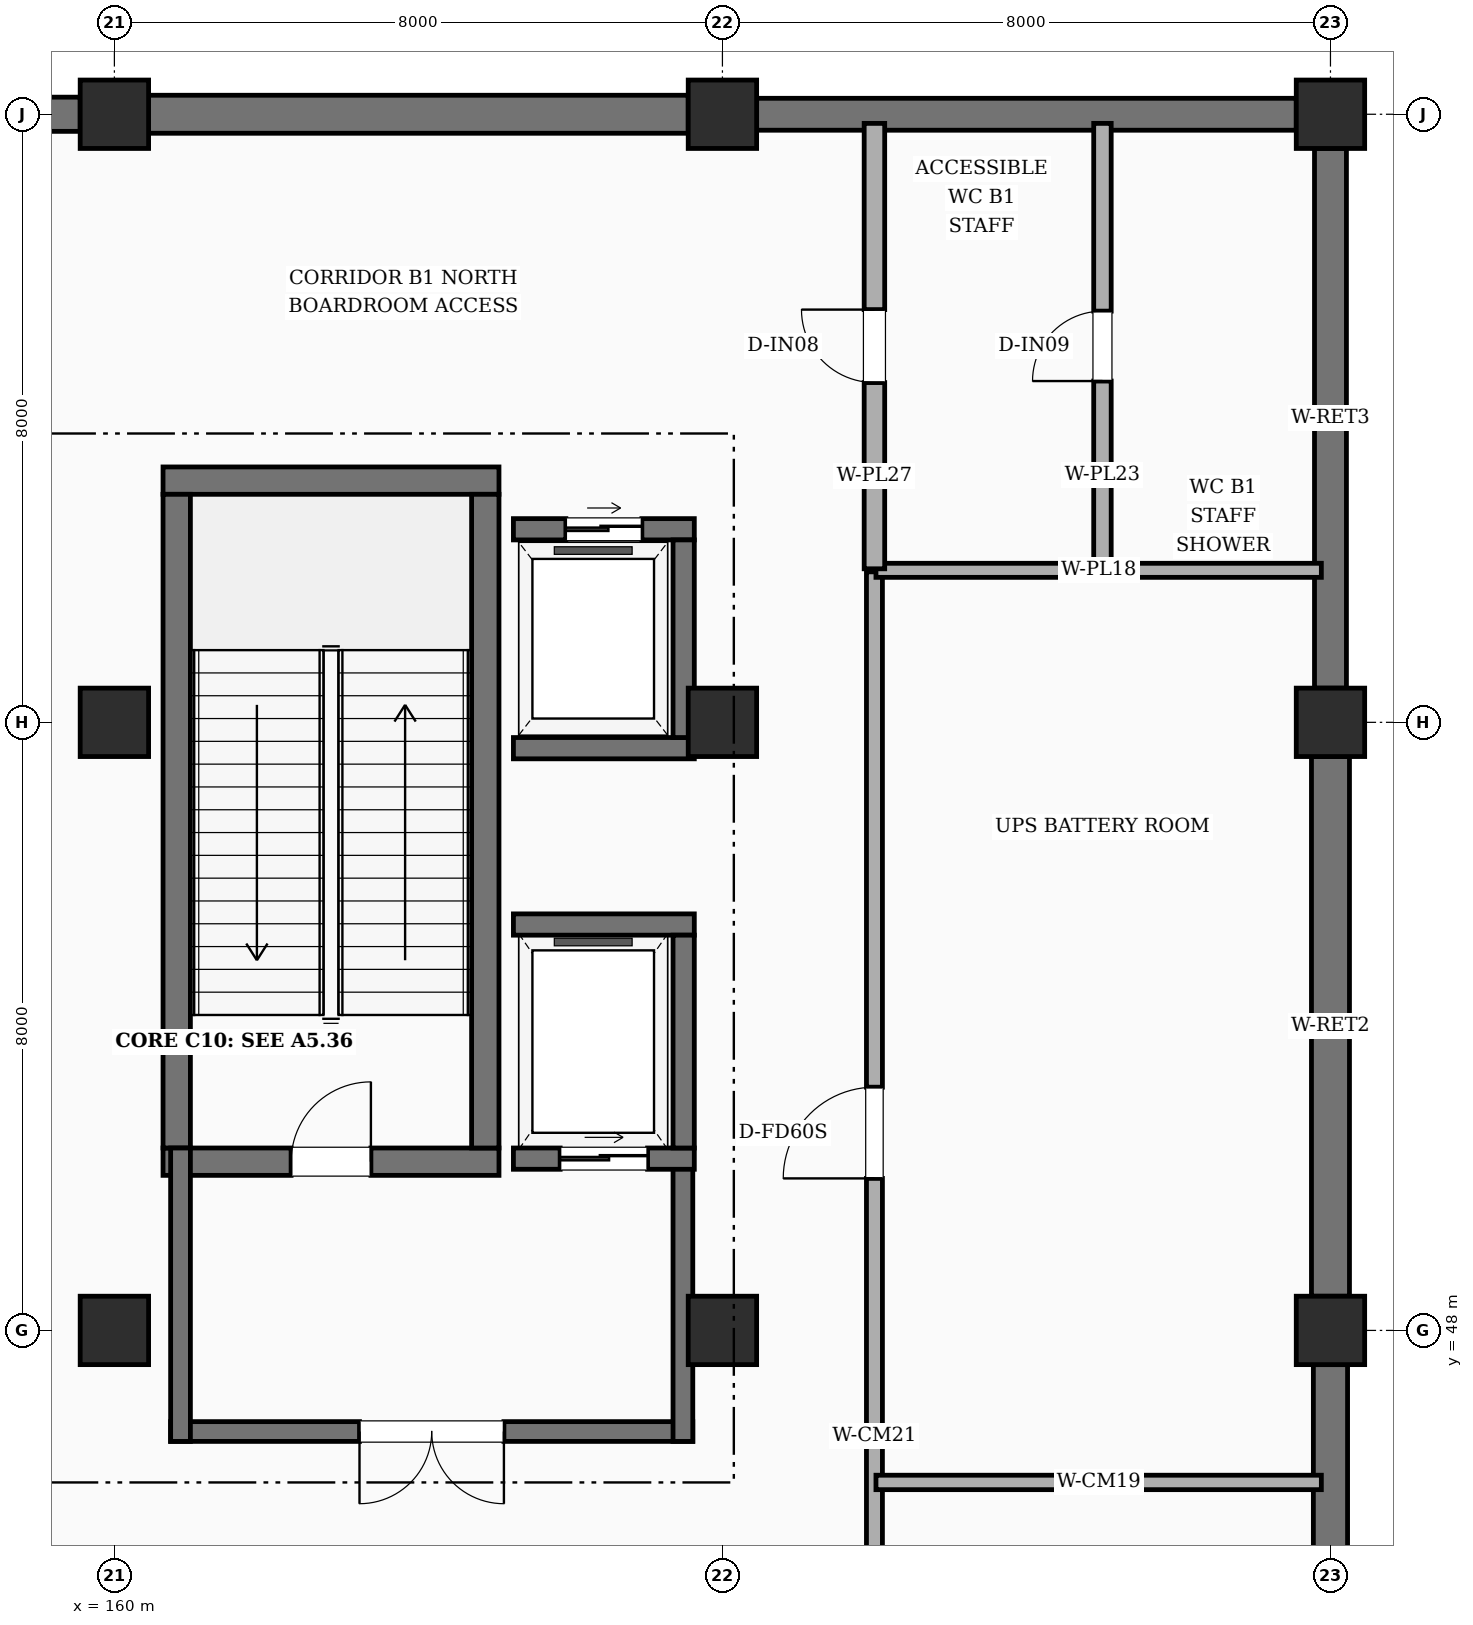
"""IFC4 building model, lengths in metres.
Left out: names, types, materials, properties, quantities, classifications, styles, units other than length and angle.
Written with IfcOpenShell. Run it as: python <this file> out.ifc"""

import sys

from ifc_helpers import new_model, si_unit, direction, frame, frame_2d, origin, origin_2d, place, context, subcontext, project, spatial, rectangle, extrude, element, fill, save


model = new_model("IFC4")
c1 = context("Model", 3, precision=1e-05, world=origin(), true_north=direction((0.0, 1.0)))
c2 = subcontext(c1, "Body", "Model", "MODEL_VIEW")
j1 = project(units=[si_unit("LENGTHUNIT", "METRE"), si_unit("PLANEANGLEUNIT", "RADIAN")], contexts=[c1])
p1 = place(None, origin())
s1 = spatial("IfcSite", under=j1, at=p1, CompositionType="ELEMENT")
p2 = place(p1, origin())
s2 = spatial("IfcBuilding", under=s1, at=p2, CompositionType="ELEMENT")
p3 = place(p2, frame((0.0, 0.0, -5.4)))
s3 = spatial("IfcBuildingStorey", under=s2, at=p3, CompositionType="ELEMENT", Elevation=-5.4)
for number, where, z_axis, x_axis in (
    (1, (160.0, 48.0, -0.4), (0.0, 0.0, 1.0), (1.0, 0.0, 0.0)),
    (2, (160.0, 56.0, -0.4), (0.0, 0.0, 1.0), (1.0, 0.0, 0.0)),
    (3, (160.0, 64.0, -0.4), (0.0, 0.0, 1.0), (1.0, 0.0, 0.0)),
    (4, (168.0, 48.0, -0.4), (0.0, 0.0, 1.0), (1.0, 0.0, 0.0)),
    (5, (168.0, 56.0, -0.4), (0.0, 0.0, 1.0), (1.0, 0.0, 0.0)),
    (6, (168.0, 64.0, -0.4), (0.0, 0.0, 1.0), (1.0, 0.0, 0.0)),
    (7, (176.0, 48.0, -0.4), (0.0, 0.0, 1.0), (1.0, 0.0, 0.0)),
    (8, (176.0, 56.0, -0.4), (0.0, 0.0, 1.0), (1.0, 0.0, 0.0)),
    (9, (176.0, 64.0, -0.4), (0.0, 0.0, 1.0), (1.0, 0.0, 0.0)),
):
    element("IfcColumn", number, at=place(p3, frame(where, z_axis=z_axis, x_axis=x_axis)), inside=s3, PredefinedType="COLUMN", context=c2, shape_type="SweptSolid", body=[
        extrude(rectangle(XDim=0.9, YDim=0.9, at=origin_2d()), origin(), (0.0, 0.0, 1.0), 5.8),
    ])
p4 = place(p3, frame((176.0, 40.45, 0.0), z_axis=(0.0, 0.0, 1.0), x_axis=(0.0, 1.0, 0.0)))
e10 = element("IfcWall", 10, at=p4, inside=s3, PredefinedType="USERDEFINED", context=c2, shape_type="SweptSolid", body=[
    extrude(rectangle(XDim=7.1, YDim=0.45, at=frame_2d((3.55, 0.0))), origin(), (0.0, 0.0, 1.0), 4.36),
])
p5 = place(p3, frame((176.0, 48.45, 0.0), z_axis=(0.0, 0.0, 1.0), x_axis=(0.0, 1.0, 0.0)))
e11 = element("IfcWall", 11, at=p5, inside=s3, PredefinedType="USERDEFINED", context=c2, shape_type="SweptSolid", body=[
    extrude(rectangle(XDim=7.1, YDim=0.5, at=frame_2d((3.55, 0.0))), origin(), (0.0, 0.0, 1.0), 4.36),
])
p6 = place(p3, frame((176.0, 56.45, 0.0), z_axis=(0.0, 0.0, 1.0), x_axis=(0.0, 1.0, 0.0)))
e12 = element("IfcWall", 12, at=p6, inside=s3, PredefinedType="USERDEFINED", context=c2, shape_type="SweptSolid", body=[
    extrude(rectangle(XDim=7.1, YDim=0.42, at=frame_2d((3.55, 0.0))), origin(), (0.0, 0.0, 1.0), 4.36),
])
p7 = place(p3, frame((152.45, 64.0, 0.0), z_axis=(0.0, 0.0, 1.0), x_axis=(1.0, 0.0, 0.0)))
e13 = element("IfcWall", 13, at=p7, inside=s3, PredefinedType="USERDEFINED", context=c2, shape_type="SweptSolid", body=[
    extrude(rectangle(XDim=7.1, YDim=0.45, at=frame_2d((3.55, 0.0))), origin(), (0.0, 0.0, 1.0), 4.11),
])
p8 = place(p3, frame((160.45, 64.0, 0.0), z_axis=(0.0, 0.0, 1.0), x_axis=(1.0, 0.0, 0.0)))
e14 = element("IfcWall", 14, at=p8, inside=s3, PredefinedType="USERDEFINED", context=c2, shape_type="SweptSolid", body=[
    extrude(rectangle(XDim=7.1, YDim=0.5, at=frame_2d((3.55, 0.0))), origin(), (0.0, 0.0, 1.0), 4.11),
])
p9 = place(p3, frame((168.45, 64.0, 0.0), z_axis=(0.0, 0.0, 1.0), x_axis=(1.0, 0.0, 0.0)))
e15 = element("IfcWall", 15, at=p9, inside=s3, PredefinedType="USERDEFINED", context=c2, shape_type="SweptSolid", body=[
    extrude(rectangle(XDim=7.1, YDim=0.42, at=frame_2d((3.55, 0.0))), origin(), (0.0, 0.0, 1.0), 4.11),
])
p10 = place(p3, frame((160.64, 50.22, 0.0), z_axis=(0.0, 0.0, 1.0), x_axis=(1.0, 0.0, 0.0)))
e16 = element("IfcWall", 16, at=p10, inside=s3, PredefinedType="SHEAR", context=c2, shape_type="SweptSolid", body=[
    extrude(rectangle(XDim=4.42, YDim=0.36, at=frame_2d((2.21, 0.0))), origin(), (0.0, 0.0, 1.0), 5.4),
])
p11 = place(p10, frame((1.685, 0.0, 0.0)))
e17 = element("IfcOpeningElement", 17, at=p11, cuts=e16, PredefinedType="OPENING", context=c2, shape_type="SweptSolid", body=[
    extrude(rectangle(XDim=1.05, YDim=2.15, at=frame_2d((0.525, 1.075))), frame((0.0, 0.19, 0.0), z_axis=(0.0, -1.0, 0.0), x_axis=(1.0, 0.0, 0.0)), (0.0, 0.0, 1.0), 0.38),
])
p12 = place(p3, frame((160.64, 59.18, 0.0), z_axis=(0.0, 0.0, 1.0), x_axis=(1.0, 0.0, 0.0)))
e18 = element("IfcWall", 18, at=p12, inside=s3, PredefinedType="SHEAR", context=c2, shape_type="SweptSolid", body=[
    extrude(rectangle(XDim=4.42, YDim=0.36, at=frame_2d((2.21, 0.0))), origin(), (0.0, 0.0, 1.0), 5.4),
])
for number, where, z_axis, x_axis in (
    (19, (160.82, 50.4, 0.0), (0.0, 0.0, 1.0), (0.0, 1.0, 0.0)),
    (20, (164.88, 50.4, 0.0), (0.0, 0.0, 1.0), (0.0, 1.0, 0.0)),
):
    element("IfcWall", number, at=place(p3, frame(where, z_axis=z_axis, x_axis=x_axis)), inside=s3, PredefinedType="SHEAR", context=c2, shape_type="SweptSolid", body=[
        extrude(rectangle(XDim=8.6, YDim=0.36, at=frame_2d((4.3, 0.0))), origin(), (0.0, 0.0, 1.0), 5.4),
    ])
p13 = place(p3, frame((167.61, 46.67, 0.0), z_axis=(0.0, 0.0, 1.0), x_axis=(-1.0, 0.0, 0.0)))
e21 = element("IfcWall", 21, at=p13, inside=s3, PredefinedType="SHEAR", context=c2, shape_type="SweptSolid", body=[
    extrude(rectangle(XDim=6.87, YDim=0.26, at=frame_2d((3.435, 0.0))), origin(), (0.0, 0.0, 1.0), 5.4),
])
p14 = place(p13, frame((2.485, 0.0, 0.0)))
e22 = element("IfcOpeningElement", 22, at=p14, cuts=e21, PredefinedType="OPENING", context=c2, shape_type="SweptSolid", body=[
    extrude(rectangle(XDim=1.9, YDim=2.25, at=frame_2d((0.95, 1.125))), frame((0.0, 0.14, 0.0), z_axis=(0.0, -1.0, 0.0), x_axis=(1.0, 0.0, 0.0)), (0.0, 0.0, 1.0), 0.28),
])
for number, where, z_axis, x_axis in (
    (23, (160.87, 46.54, 0.0), (0.0, 0.0, 1.0), (0.0, 1.0, 0.0)),
    (24, (167.48, 46.54, 0.0), (0.0, 0.0, 1.0), (0.0, 1.0, 0.0)),
):
    element("IfcWall", number, at=place(p3, frame(where, z_axis=z_axis, x_axis=x_axis)), inside=s3, PredefinedType="SHEAR", context=c2, shape_type="SweptSolid", body=[
        extrude(rectangle(XDim=3.86, YDim=0.26, at=frame_2d((1.93, 0.0))), origin(), (0.0, 0.0, 1.0), 5.4),
    ])
p15 = place(p3, frame((165.25, 50.26, 0.0), z_axis=(0.0, 0.0, 1.0), x_axis=(1.0, 0.0, 0.0)))
e25 = element("IfcWall", 25, at=p15, inside=s3, PredefinedType="SHEAR", context=c2, shape_type="SweptSolid", body=[
    extrude(rectangle(XDim=2.38, YDim=0.28, at=frame_2d((1.19, 0.0))), origin(), (0.0, 0.0, 1.0), 5.4),
])
p16 = place(p15, frame((0.615, 0.0, 0.0)))
e26 = element("IfcOpeningElement", 26, at=p16, cuts=e25, PredefinedType="OPENING", context=c2, shape_type="SweptSolid", body=[
    extrude(rectangle(XDim=1.15, YDim=2.2, at=frame_2d((0.575, 1.1))), frame((0.0, 0.15, 0.0), z_axis=(0.0, -1.0, 0.0), x_axis=(1.0, 0.0, 0.0)), (0.0, 0.0, 1.0), 0.3),
])
p17 = place(p3, frame((165.25, 53.34, 0.0), z_axis=(0.0, 0.0, 1.0), x_axis=(1.0, 0.0, 0.0)))
e27 = element("IfcWall", 27, at=p17, inside=s3, PredefinedType="SHEAR", context=c2, shape_type="SweptSolid", body=[
    extrude(rectangle(XDim=2.38, YDim=0.28, at=frame_2d((1.19, 0.0))), origin(), (0.0, 0.0, 1.0), 5.4),
])
p18 = place(p3, frame((167.49, 50.4, 0.0), z_axis=(0.0, 0.0, 1.0), x_axis=(0.0, 1.0, 0.0)))
e28 = element("IfcWall", 28, at=p18, inside=s3, PredefinedType="SHEAR", context=c2, shape_type="SweptSolid", body=[
    extrude(rectangle(XDim=2.8, YDim=0.28, at=frame_2d((1.4, 0.0))), origin(), (0.0, 0.0, 1.0), 5.4),
])
p19 = place(p3, frame((165.25, 55.66, 0.0), z_axis=(0.0, 0.0, 1.0), x_axis=(1.0, 0.0, 0.0)))
e29 = element("IfcWall", 29, at=p19, inside=s3, PredefinedType="SHEAR", context=c2, shape_type="SweptSolid", body=[
    extrude(rectangle(XDim=2.38, YDim=0.28, at=frame_2d((1.19, 0.0))), origin(), (0.0, 0.0, 1.0), 5.4),
])
p20 = place(p3, frame((165.25, 58.54, 0.0), z_axis=(0.0, 0.0, 1.0), x_axis=(1.0, 0.0, 0.0)))
e30 = element("IfcWall", 30, at=p20, inside=s3, PredefinedType="SHEAR", context=c2, shape_type="SweptSolid", body=[
    extrude(rectangle(XDim=2.38, YDim=0.28, at=frame_2d((1.19, 0.0))), origin(), (0.0, 0.0, 1.0), 5.4),
])
p21 = place(p20, frame((0.69, 0.0, 0.0)))
e31 = element("IfcOpeningElement", 31, at=p21, cuts=e30, PredefinedType="OPENING", context=c2, shape_type="SweptSolid", body=[
    extrude(rectangle(XDim=1.0, YDim=2.15, at=frame_2d((0.5, 1.075))), frame((0.0, 0.15, 0.0), z_axis=(0.0, -1.0, 0.0), x_axis=(1.0, 0.0, 0.0)), (0.0, 0.0, 1.0), 0.3),
])
p22 = place(p3, frame((167.49, 55.8, 0.0), z_axis=(0.0, 0.0, 1.0), x_axis=(0.0, 1.0, 0.0)))
e32 = element("IfcWall", 32, at=p22, inside=s3, PredefinedType="SHEAR", context=c2, shape_type="SweptSolid", body=[
    extrude(rectangle(XDim=2.6, YDim=0.28, at=frame_2d((1.3, 0.0))), origin(), (0.0, 0.0, 1.0), 5.4),
])
p23 = place(p3, frame((170.0, 43.22, 0.0), z_axis=(0.0, 0.0, 1.0), x_axis=(0.0, 1.0, 0.0)))
e33 = element("IfcWall", 33, at=p23, inside=s3, PredefinedType="SOLIDWALL", context=c2, shape_type="SweptSolid", body=[
    extrude(rectangle(XDim=14.76, YDim=0.21, at=frame_2d((7.38, 0.0))), origin(), (0.0, 0.0, 1.0), 4.11),
])
p24 = place(p23, frame((6.78, 0.0, 0.0)))
e34 = element("IfcOpeningElement", 34, at=p24, cuts=e33, PredefinedType="OPENING", context=c2, shape_type="SweptSolid", body=[
    extrude(rectangle(XDim=1.2, YDim=2.15, at=frame_2d((0.6, 1.075))), frame((0.0, 0.115, 0.0), z_axis=(0.0, -1.0, 0.0), x_axis=(1.0, 0.0, 0.0)), (0.0, 0.0, 1.0), 0.23),
])
p25 = place(p3, frame((170.02, 46.0, 0.0), z_axis=(0.0, 0.0, 1.0), x_axis=(1.0, 0.0, 0.0)))
e35 = element("IfcWall", 35, at=p25, inside=s3, PredefinedType="SOLIDWALL", context=c2, shape_type="SweptSolid", body=[
    extrude(rectangle(XDim=5.86, YDim=0.19, at=frame_2d((2.93, 0.0))), origin(), (0.0, 0.0, 1.0), 4.36),
])
p26 = place(p3, frame((170.02, 58.0, 0.0), z_axis=(0.0, 0.0, 1.0), x_axis=(1.0, 0.0, 0.0)))
e36 = element("IfcWall", 36, at=p26, inside=s3, PredefinedType="PLUMBINGWALL", context=c2, shape_type="SweptSolid", body=[
    extrude(rectangle(XDim=5.86, YDim=0.185, at=frame_2d((2.93, 0.0))), origin(), (0.0, 0.0, 1.0), 4.36),
])
p27 = place(p3, frame((170.0, 58.02, 0.0), z_axis=(0.0, 0.0, 1.0), x_axis=(0.0, 1.0, 0.0)))
e37 = element("IfcWall", 37, at=p27, inside=s3, PredefinedType="PLUMBINGWALL", context=c2, shape_type="SweptSolid", body=[
    extrude(rectangle(XDim=5.86, YDim=0.27, at=frame_2d((2.93, 0.0))), origin(), (0.0, 0.0, 1.0), 4.11),
])
p28 = place(p27, frame((2.45, 0.0, 0.0)))
e38 = element("IfcOpeningElement", 38, at=p28, cuts=e37, PredefinedType="OPENING", context=c2, shape_type="SweptSolid", body=[
    extrude(rectangle(XDim=0.96, YDim=2.1, at=frame_2d((0.48, 1.05))), frame((0.0, 0.145, 0.0), z_axis=(0.0, -1.0, 0.0), x_axis=(1.0, 0.0, 0.0)), (0.0, 0.0, 1.0), 0.29),
])
p29 = place(p3, frame((173.0, 58.02, 0.0), z_axis=(0.0, 0.0, 1.0), x_axis=(0.0, 1.0, 0.0)))
e39 = element("IfcWall", 39, at=p29, inside=s3, PredefinedType="PLUMBINGWALL", context=c2, shape_type="SweptSolid", body=[
    extrude(rectangle(XDim=5.86, YDim=0.23, at=frame_2d((2.93, 0.0))), origin(), (0.0, 0.0, 1.0), 4.11),
])
p30 = place(p29, frame((2.47, 0.0, 0.0)))
e40 = element("IfcOpeningElement", 40, at=p30, cuts=e39, PredefinedType="OPENING", context=c2, shape_type="SweptSolid", body=[
    extrude(rectangle(XDim=0.92, YDim=2.1, at=frame_2d((0.46, 1.05))), frame((0.0, 0.125, 0.0), z_axis=(0.0, -1.0, 0.0), x_axis=(1.0, 0.0, 0.0)), (0.0, 0.0, 1.0), 0.25),
])
p31 = place(p11, origin())
e41 = element("IfcDoor", 41, at=p31, inside=s3, OperationType="SINGLE_SWING_RIGHT", PredefinedType="DOOR", context=c2, shape_type="SweptSolid", body=[
    extrude(rectangle(XDim=1.05, YDim=2.15, at=frame_2d((0.525, 1.075))), frame((0.0, 0.025, 0.0), z_axis=(0.0, -1.0, 0.0), x_axis=(1.0, 0.0, 0.0)), (0.0, 0.0, 1.0), 0.05),
])
fill(e17, e41)
p32 = place(p14, origin())
e42 = element("IfcDoor", 42, at=p32, inside=s3, OperationType="DOUBLE_DOOR_SINGLE_SWING", PredefinedType="DOOR", context=c2, shape_type="SweptSolid", body=[
    extrude(rectangle(XDim=1.9, YDim=2.25, at=frame_2d((0.95, 1.125))), frame((0.0, 0.025, 0.0), z_axis=(0.0, -1.0, 0.0), x_axis=(1.0, 0.0, 0.0)), (0.0, 0.0, 1.0), 0.05),
])
fill(e22, e42)
p33 = place(p16, origin())
e43 = element("IfcDoor", 43, at=p33, inside=s3, OperationType="SLIDING_TO_LEFT", PredefinedType="DOOR", context=c2, shape_type="SweptSolid", body=[
    extrude(rectangle(XDim=1.15, YDim=2.2, at=frame_2d((0.575, 1.1))), frame((0.0, 0.025, 0.0), z_axis=(0.0, -1.0, 0.0), x_axis=(1.0, 0.0, 0.0)), (0.0, 0.0, 1.0), 0.05),
])
fill(e26, e43)
p34 = place(p21, origin())
e44 = element("IfcDoor", 44, at=p34, inside=s3, OperationType="SLIDING_TO_LEFT", PredefinedType="DOOR", context=c2, shape_type="SweptSolid", body=[
    extrude(rectangle(XDim=1.0, YDim=2.15, at=frame_2d((0.5, 1.075))), frame((0.0, 0.025, 0.0), z_axis=(0.0, -1.0, 0.0), x_axis=(1.0, 0.0, 0.0)), (0.0, 0.0, 1.0), 0.05),
])
fill(e31, e44)
p35 = place(p24, origin())
e45 = element("IfcDoor", 45, at=p35, inside=s3, OperationType="SINGLE_SWING_LEFT", PredefinedType="DOOR", context=c2, shape_type="SweptSolid", body=[
    extrude(rectangle(XDim=1.2, YDim=2.15, at=frame_2d((0.6, 1.075))), frame((0.0, 0.025, 0.0), z_axis=(0.0, -1.0, 0.0), x_axis=(1.0, 0.0, 0.0)), (0.0, 0.0, 1.0), 0.05),
])
fill(e34, e45)
p36 = place(p28, origin())
e46 = element("IfcDoor", 46, at=p36, inside=s3, OperationType="SINGLE_SWING_RIGHT", PredefinedType="DOOR", context=c2, shape_type="SweptSolid", body=[
    extrude(rectangle(XDim=0.96, YDim=2.1, at=frame_2d((0.48, 1.05))), frame((0.0, 0.025, 0.0), z_axis=(0.0, -1.0, 0.0), x_axis=(1.0, 0.0, 0.0)), (0.0, 0.0, 1.0), 0.05),
])
fill(e38, e46)
p37 = place(p30, origin())
e47 = element("IfcDoor", 47, at=p37, inside=s3, OperationType="SINGLE_SWING_LEFT", PredefinedType="DOOR", context=c2, shape_type="SweptSolid", body=[
    extrude(rectangle(XDim=0.92, YDim=2.1, at=frame_2d((0.46, 1.05))), frame((0.0, 0.025, 0.0), z_axis=(0.0, -1.0, 0.0), x_axis=(1.0, 0.0, 0.0)), (0.0, 0.0, 1.0), 0.05),
])
fill(e40, e47)
save(model, sys.argv[1])
